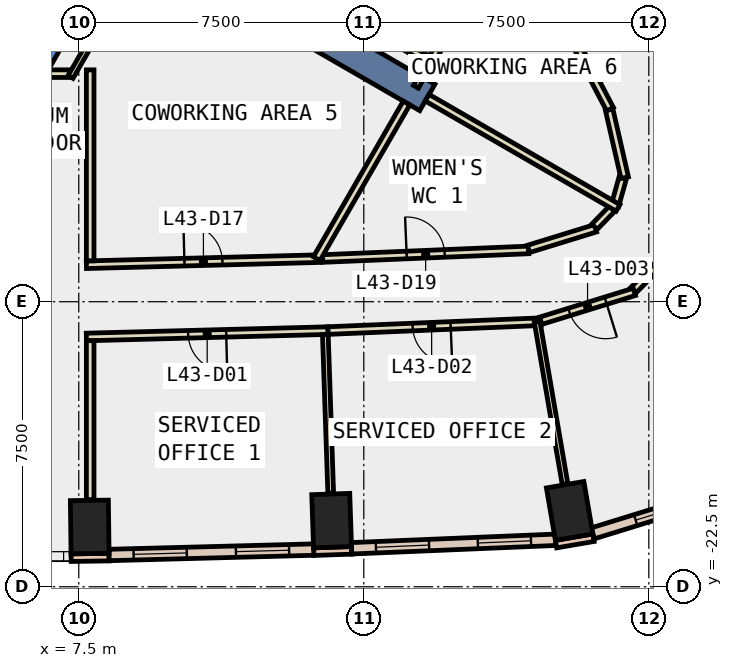
"""IFC4 building model, lengths in metres.
Left out: names, types, materials, properties, quantities, classifications, styles, units other than length and angle.
Written with IfcOpenShell. Run it as: python <this file> out.ifc"""

import sys

from ifc_helpers import new_model, si_unit, direction, frame, frame_2d, origin, origin_2d, place, context, subcontext, project, spatial, polyline, rectangle, outline, extrude, element, fill, save


model = new_model("IFC4")
c1 = context("Model", 3, precision=1e-05, world=origin(), true_north=direction((0.0, 1.0)))
c2 = subcontext(c1, "Body", "Model", "MODEL_VIEW")
j1 = project(units=[si_unit("LENGTHUNIT", "METRE"), si_unit("PLANEANGLEUNIT", "RADIAN")], contexts=[c1])
p1 = place(None, origin())
s1 = spatial("IfcSite", under=j1, at=p1, CompositionType="ELEMENT")
p2 = place(p1, origin())
s2 = spatial("IfcBuilding", under=s1, at=p2, CompositionType="ELEMENT")
p3 = place(p2, frame((0.0, 0.0, 194.0)))
s3 = spatial("IfcBuildingStorey", under=s2, at=p3, CompositionType="ELEMENT", Elevation=194.0)
for number, where, z_axis, x_axis in (
    (1, (7.788, -20.927, -0.4), (0.0, 0.0, 1.0), (1.0, 0.013, 0.0)),
    (2, (14.154, -20.76, -0.4), (0.0, 0.0, 1.0), (0.999, 0.034, 0.0)),
    (3, (20.417, -20.505, -0.4), (0.0, 0.0, 1.0), (0.986, 0.169, 0.0)),
):
    element("IfcColumn", number, at=place(p3, frame(where, z_axis=z_axis, x_axis=x_axis)), inside=s3, PredefinedType="COLUMN", context=c2, shape_type="SweptSolid", body=[
        extrude(rectangle(XDim=1.0, YDim=1.4, at=origin_2d()), origin(), (0.0, 0.0, 1.0), 4.2),
    ])
p4 = place(p3, frame((0.0, 0.0, -0.4)))
e4 = element("IfcWall", 4, at=p4, inside=s3, PredefinedType="SHEAR", context=c2, shape_type="SweptSolid", body=[
    extrude(outline(polyline([(6.64, -9.0), (13.279, 2.5), (12.471, 2.5), (6.235, -8.3), (6.64, -9.0)])), origin(), (0.0, 0.0, 1.0), 4.2),
])
p5 = place(p3, frame((8.877, -5.125, -0.4), z_axis=(0.0, 0.0, 1.0), x_axis=(0.866017533419, -0.500013631625, 0.0)))
e5 = element("IfcWall", 5, at=p5, inside=s3, PredefinedType="SHEAR", context=c2, shape_type="SweptSolid", body=[
    extrude(rectangle(XDim=9.0, YDim=0.8, at=frame_2d((4.5, 0.0))), origin(), (0.0, 0.0, 1.0), 4.2),
])
p6 = place(p3, frame((7.299, -21.734, 0.0), z_axis=(0.0, 0.0, 1.0), x_axis=(0.999903186316, 0.013914668364, 0.0)))
e6 = element("IfcWall", 6, at=p6, inside=s3, PredefinedType="STANDARD", context=c2, shape_type="SweptSolid", body=[
    extrude(rectangle(XDim=1.0, YDim=0.2, at=frame_2d((0.5, 0.0))), origin(), (0.0, 0.0, 1.0), 3.8),
])
p7 = place(p3, frame((13.682, -21.576, 0.0), z_axis=(0.0, 0.0, 1.0), x_axis=(0.999423561854, 0.033949138587, 0.0)))
e7 = element("IfcWall", 7, at=p7, inside=s3, PredefinedType="STANDARD", context=c2, shape_type="SweptSolid", body=[
    extrude(rectangle(XDim=1.0, YDim=0.2, at=frame_2d((0.5, 0.0))), origin(), (0.0, 0.0, 1.0), 3.8),
])
p8 = place(p3, frame((20.059, -21.378, 0.0), z_axis=(0.0, 0.0, 1.0), x_axis=(0.985631544579, 0.168909615862, 0.0)))
e8 = element("IfcWall", 8, at=p8, inside=s3, PredefinedType="STANDARD", context=c2, shape_type="SweptSolid", body=[
    extrude(rectangle(XDim=1.0, YDim=0.2, at=frame_2d((0.5, 0.0))), origin(), (0.0, 0.0, 1.0), 3.8),
])
p9 = place(p3, frame((8.297, -21.664, 0.0), z_axis=(0.0, 0.0, 1.0), x_axis=(0.999651908676, 0.026382977093, 0.0)))
e9 = element("IfcWall", 9, at=p9, inside=s3, PredefinedType="STANDARD", context=c2, shape_type="SweptSolid", body=[
    extrude(rectangle(XDim=5.386, YDim=0.3, at=frame_2d((2.693, 0.0))), origin(), (0.0, 0.0, 1.0), 3.8),
])
p10 = place(p9, frame((0.646, 0.0, 0.9)))
e10 = element("IfcOpeningElement", 10, at=p10, cuts=e9, PredefinedType="OPENING", context=c2, shape_type="SweptSolid", body=[
    extrude(rectangle(XDim=1.4, YDim=2.6, at=frame_2d((0.7, 1.3))), frame((0.0, 0.16, 0.0), z_axis=(0.0, -1.0, 0.0), x_axis=(1.0, 0.0, 0.0)), (0.0, 0.0, 1.0), 0.32),
])
p11 = place(p9, frame((3.339, 0.0, 0.9)))
e11 = element("IfcOpeningElement", 11, at=p11, cuts=e9, PredefinedType="OPENING", context=c2, shape_type="SweptSolid", body=[
    extrude(rectangle(XDim=1.4, YDim=2.6, at=frame_2d((0.7, 1.3))), frame((0.0, 0.16, 0.0), z_axis=(0.0, -1.0, 0.0), x_axis=(1.0, 0.0, 0.0)), (0.0, 0.0, 1.0), 0.32),
])
p12 = place(p3, frame((14.678, -21.488, 0.0), z_axis=(0.0, 0.0, 1.0), x_axis=(0.999127941775, 0.041753514387, 0.0)))
e12 = element("IfcWall", 12, at=p12, inside=s3, PredefinedType="STANDARD", context=c2, shape_type="SweptSolid", body=[
    extrude(rectangle(XDim=5.368, YDim=0.3, at=frame_2d((2.684, 0.0))), origin(), (0.0, 0.0, 1.0), 3.8),
])
p13 = place(p12, frame((0.642, 0.0, 0.9)))
e13 = element("IfcOpeningElement", 13, at=p13, cuts=e12, PredefinedType="OPENING", context=c2, shape_type="SweptSolid", body=[
    extrude(rectangle(XDim=1.4, YDim=2.6, at=frame_2d((0.7, 1.3))), frame((0.0, 0.16, 0.0), z_axis=(0.0, -1.0, 0.0), x_axis=(1.0, 0.0, 0.0)), (0.0, 0.0, 1.0), 0.32),
])
p14 = place(p12, frame((3.326, 0.0, 0.9)))
e14 = element("IfcOpeningElement", 14, at=p14, cuts=e12, PredefinedType="OPENING", context=c2, shape_type="SweptSolid", body=[
    extrude(rectangle(XDim=1.4, YDim=2.6, at=frame_2d((0.7, 1.3))), frame((0.0, 0.16, 0.0), z_axis=(0.0, -1.0, 0.0), x_axis=(1.0, 0.0, 0.0)), (0.0, 0.0, 1.0), 0.32),
])
p15 = place(p3, frame((21.024, -21.095, 0.0), z_axis=(0.0, 0.0, 1.0), x_axis=(0.955692086233, 0.29436819854, 0.0)))
e15 = element("IfcWall", 15, at=p15, inside=s3, PredefinedType="STANDARD", context=c2, shape_type="SweptSolid", body=[
    extrude(rectangle(XDim=3.767, YDim=0.3, at=frame_2d((1.884, 0.0))), origin(), (0.0, 0.0, 1.0), 3.8),
])
p16 = place(p15, frame((1.183, 0.0, 0.9)))
e16 = element("IfcOpeningElement", 16, at=p16, cuts=e15, PredefinedType="OPENING", context=c2, shape_type="SweptSolid", body=[
    extrude(rectangle(XDim=1.4, YDim=2.6, at=frame_2d((0.7, 1.3))), frame((0.0, 0.16, 0.0), z_axis=(0.0, -1.0, 0.0), x_axis=(1.0, 0.0, 0.0)), (0.0, 0.0, 1.0), 0.32),
])
p17 = place(p3, frame((7.7, -14.027, 0.0), z_axis=(0.0, 0.0, 1.0), x_axis=(0.999653919353, 0.026306682088, 0.0)))
e17 = element("IfcWall", 17, at=p17, inside=s3, PredefinedType="PARTITIONING", context=c2, shape_type="SweptSolid", body=[
    extrude(rectangle(XDim=6.162, YDim=0.2, at=frame_2d((3.081, 0.0))), origin(), (0.0, 0.0, 1.0), 3.8),
])
p18 = place(p17, frame((2.581, 0.0, 0.0)))
e18 = element("IfcOpeningElement", 18, at=p18, cuts=e17, PredefinedType="OPENING", context=c2, shape_type="SweptSolid", body=[
    extrude(rectangle(XDim=1.0, YDim=2.1, at=frame_2d((0.5, 1.05))), frame((0.0, 0.11, 0.0), z_axis=(0.0, -1.0, 0.0), x_axis=(1.0, 0.0, 0.0)), (0.0, 0.0, 1.0), 0.22),
])
p19 = place(p3, frame((13.919, -13.863, 0.0), z_axis=(0.0, 0.0, 1.0), x_axis=(0.999130261307, 0.041697972867, 0.0)))
e19 = element("IfcWall", 19, at=p19, inside=s3, PredefinedType="PARTITIONING", context=c2, shape_type="SweptSolid", body=[
    extrude(rectangle(XDim=5.422, YDim=0.2, at=frame_2d((2.711, 0.0))), origin(), (0.0, 0.0, 1.0), 3.8),
])
p20 = place(p19, frame((2.211, 0.0, 0.0)))
e20 = element("IfcOpeningElement", 20, at=p20, cuts=e19, PredefinedType="OPENING", context=c2, shape_type="SweptSolid", body=[
    extrude(rectangle(XDim=1.0, YDim=2.1, at=frame_2d((0.5, 1.05))), frame((0.0, 0.11, 0.0), z_axis=(0.0, -1.0, 0.0), x_axis=(1.0, 0.0, 0.0)), (0.0, 0.0, 1.0), 0.22),
])
p21 = place(p3, frame((19.332, -13.611, 0.0), z_axis=(0.0, 0.0, 1.0), x_axis=(0.955790442908, 0.294048685161, 0.0)))
e21 = element("IfcWall", 21, at=p21, inside=s3, PredefinedType="PARTITIONING", context=c2, shape_type="SweptSolid", body=[
    extrude(rectangle(XDim=1.846, YDim=0.2, at=frame_2d((0.923, 0.0))), origin(), (0.0, 0.0, 1.0), 3.8),
])
p22 = place(p3, frame((21.072, -13.026, 0.0), z_axis=(0.0, 0.0, 1.0), x_axis=(0.697252405765, 0.716825698936, 0.0)))
e22 = element("IfcWall", 22, at=p22, inside=s3, PredefinedType="PARTITIONING", context=c2, shape_type="SweptSolid", body=[
    extrude(rectangle(XDim=0.661, YDim=0.2, at=frame_2d((0.331, 0.0))), origin(), (0.0, 0.0, 1.0), 3.8),
])
p23 = place(p3, frame((21.608, -12.476, 0.0), z_axis=(0.0, 0.0, 1.0), x_axis=(0.270277025631, 0.962782597171, 0.0)))
e23 = element("IfcWall", 23, at=p23, inside=s3, PredefinedType="PARTITIONING", context=c2, shape_type="SweptSolid", body=[
    extrude(rectangle(XDim=0.77, YDim=0.2, at=frame_2d((0.385, 0.0))), origin(), (0.0, 0.0, 1.0), 3.8),
])
p24 = place(p3, frame((21.866, -11.737, 0.0), z_axis=(0.0, 0.0, 1.0), x_axis=(-0.222871656966, 0.974847795567, 0.0)))
e24 = element("IfcWall", 24, at=p24, inside=s3, PredefinedType="PARTITIONING", context=c2, shape_type="SweptSolid", body=[
    extrude(rectangle(XDim=1.839, YDim=0.2, at=frame_2d((0.919, 0.0))), origin(), (0.0, 0.0, 1.0), 3.8),
])
p25 = place(p3, frame((21.48, -9.935, 0.0), z_axis=(0.0, 0.0, 1.0), x_axis=(-0.465356775138, 0.885123195851, 0.0)))
e25 = element("IfcWall", 25, at=p25, inside=s3, PredefinedType="PARTITIONING", context=c2, shape_type="SweptSolid", body=[
    extrude(rectangle(XDim=5.682, YDim=0.2, at=frame_2d((2.841, 0.0))), origin(), (0.0, 0.0, 1.0), 3.8),
])
p26 = place(p25, frame((2.341, 0.0, 0.0)))
e26 = element("IfcOpeningElement", 26, at=p26, cuts=e25, PredefinedType="OPENING", context=c2, shape_type="SweptSolid", body=[
    extrude(rectangle(XDim=1.0, YDim=2.1, at=frame_2d((0.5, 1.05))), frame((0.0, 0.11, 0.0), z_axis=(0.0, -1.0, 0.0), x_axis=(1.0, 0.0, 0.0)), (0.0, 0.0, 1.0), 0.22),
])
p27 = place(p3, frame((14.059, -15.76, 0.0), z_axis=(0.0, 0.0, 1.0), x_axis=(-0.999651338269, -0.026404580978, 0.0)))
e27 = element("IfcWall", 27, at=p27, inside=s3, PredefinedType="PARTITIONING", context=c2, shape_type="SweptSolid", body=[
    extrude(rectangle(XDim=6.361, YDim=0.2, at=frame_2d((3.181, 0.0))), origin(), (0.0, 0.0, 1.0), 3.8),
])
p28 = place(p27, frame((2.681, 0.0, 0.0)))
e28 = element("IfcOpeningElement", 28, at=p28, cuts=e27, PredefinedType="OPENING", context=c2, shape_type="SweptSolid", body=[
    extrude(rectangle(XDim=1.0, YDim=2.1, at=frame_2d((0.5, 1.05))), frame((0.0, 0.11, 0.0), z_axis=(0.0, -1.0, 0.0), x_axis=(1.0, 0.0, 0.0)), (0.0, 0.0, 1.0), 0.22),
])
p29 = place(p3, frame((19.661, -15.525, 0.0), z_axis=(0.0, 0.0, 1.0), x_axis=(-0.999127706659, -0.041759140148, 0.0)))
e29 = element("IfcWall", 29, at=p29, inside=s3, PredefinedType="PARTITIONING", context=c2, shape_type="SweptSolid", body=[
    extrude(rectangle(XDim=5.607, YDim=0.2, at=frame_2d((2.803, 0.0))), origin(), (0.0, 0.0, 1.0), 3.8),
])
p30 = place(p29, frame((2.378, 0.0, 0.0)))
e30 = element("IfcOpeningElement", 30, at=p30, cuts=e29, PredefinedType="OPENING", context=c2, shape_type="SweptSolid", body=[
    extrude(rectangle(XDim=1.0, YDim=2.1, at=frame_2d((0.5, 1.05))), frame((0.0, 0.11, 0.0), z_axis=(0.0, -1.0, 0.0), x_axis=(1.0, 0.0, 0.0)), (0.0, 0.0, 1.0), 0.22),
])
p31 = place(p3, frame((23.236, -13.528, 0.0), z_axis=(0.0, 0.0, 1.0), x_axis=(-0.698551276451, -0.715560000397, 0.0)))
e31 = element("IfcWall", 31, at=p31, inside=s3, PredefinedType="PARTITIONING", context=c2, shape_type="SweptSolid", body=[
    extrude(rectangle(XDim=1.636, YDim=0.2, at=frame_2d((0.818, 0.0))), origin(), (0.0, 0.0, 1.0), 3.8),
])
p32 = place(p3, frame((22.119, -14.741, 0.0), z_axis=(0.0, 0.0, 1.0), x_axis=(-0.955612889251, -0.294625195625, 0.0)))
e32 = element("IfcWall", 32, at=p32, inside=s3, PredefinedType="PARTITIONING", context=c2, shape_type="SweptSolid", body=[
    extrude(rectangle(XDim=2.576, YDim=0.2, at=frame_2d((1.288, 0.0))), origin(), (0.0, 0.0, 1.0), 3.8),
])
p33 = place(p32, frame((0.788, 0.0, 0.0)))
e33 = element("IfcOpeningElement", 33, at=p33, cuts=e32, PredefinedType="OPENING", context=c2, shape_type="SweptSolid", body=[
    extrude(rectangle(XDim=1.0, YDim=2.1, at=frame_2d((0.5, 1.05))), frame((0.0, 0.11, 0.0), z_axis=(0.0, -1.0, 0.0), x_axis=(1.0, 0.0, 0.0)), (0.0, 0.0, 1.0), 0.22),
])
p34 = place(p3, frame((19.75, -2.563, 0.0), z_axis=(0.0, 0.0, 1.0), x_axis=(0.465444987791, -0.885076812113, 0.0)))
e34 = element("IfcWall", 34, at=p34, inside=s3, PredefinedType="PARTITIONING", context=c2, shape_type="SweptSolid", body=[
    extrude(rectangle(XDim=7.578, YDim=0.2, at=frame_2d((3.789, 0.0))), origin(), (0.0, 0.0, 1.0), 3.8),
])
p35 = place(p34, frame((3.289, 0.0, 0.0)))
e35 = element("IfcOpeningElement", 35, at=p35, cuts=e34, PredefinedType="OPENING", context=c2, shape_type="SweptSolid", body=[
    extrude(rectangle(XDim=1.0, YDim=2.1, at=frame_2d((0.5, 1.05))), frame((0.0, 0.11, 0.0), z_axis=(0.0, -1.0, 0.0), x_axis=(1.0, 0.0, 0.0)), (0.0, 0.0, 1.0), 0.22),
])
p36 = place(p3, frame((6.641, -8.999, 0.0), z_axis=(0.0, 0.0, 1.0), x_axis=(1.0, 0.0, 0.0)))
e36 = element("IfcWall", 36, at=p36, inside=s3, PredefinedType="PARTITIONING", context=c2, shape_type="SweptSolid", body=[
    extrude(rectangle(XDim=0.617, YDim=0.2, at=frame_2d((0.309, 0.0))), origin(), (0.0, 0.0, 1.0), 3.8),
])
p37 = place(p3, frame((7.283, -9.086, 0.0), z_axis=(0.0, 0.0, 1.0), x_axis=(0.499843936326, 0.866115488442, 0.0)))
e37 = element("IfcWall", 37, at=p37, inside=s3, PredefinedType="PARTITIONING", context=c2, shape_type="SweptSolid", body=[
    extrude(rectangle(XDim=3.827, YDim=0.15, at=frame_2d((1.914, 0.0))), origin(), (0.0, 0.0, 1.0), 3.8),
])
p38 = place(p3, frame((7.8, -8.899, 0.0), z_axis=(0.0, 0.0, 1.0), x_axis=(0.0, -1.0, 0.0)))
e38 = element("IfcWall", 38, at=p38, inside=s3, PredefinedType="PARTITIONING", context=c2, shape_type="SweptSolid", body=[
    extrude(rectangle(XDim=5.025, YDim=0.2, at=frame_2d((2.513, 0.0))), origin(), (0.0, 0.0, 1.0), 3.8),
])
p39 = place(p3, frame((7.8, -16.025, 0.0), z_axis=(0.0, 0.0, 1.0), x_axis=(0.0, -1.0, 0.0)))
e39 = element("IfcWall", 39, at=p39, inside=s3, PredefinedType="PARTITIONING", context=c2, shape_type="SweptSolid", body=[
    extrude(rectangle(XDim=4.182, YDim=0.2, at=frame_2d((2.091, 0.0))), origin(), (0.0, 0.0, 1.0), 3.8),
])
p40 = place(p3, frame((9.853, -4.684, 0.0), z_axis=(0.0, 0.0, 1.0), x_axis=(0.865999791918, -0.500044358431, 0.0)))
e40 = element("IfcWall", 40, at=p40, inside=s3, PredefinedType="PARTITIONING", context=c2, shape_type="SweptSolid", body=[
    extrude(rectangle(XDim=8.075, YDim=0.2, at=frame_2d((4.038, 0.0))), origin(), (0.0, 0.0, 1.0), 3.8),
])
p41 = place(p3, frame((16.125, -9.771, 0.0), z_axis=(0.0, 0.0, 1.0), x_axis=(-0.500030759312, -0.866007644159, 0.0)))
e41 = element("IfcWall", 41, at=p41, inside=s3, PredefinedType="PARTITIONING", context=c2, shape_type="SweptSolid", body=[
    extrude(rectangle(XDim=4.73, YDim=0.2, at=frame_2d((2.365, 0.0))), origin(), (0.0, 0.0, 1.0), 3.8),
])
p42 = place(p3, frame((16.71, -8.758, 0.0), z_axis=(0.0, 0.0, 1.0), x_axis=(-0.500013496215, -0.866017611601, 0.0)))
e42 = element("IfcWall", 42, at=p42, inside=s3, PredefinedType="PARTITIONING", context=c2, shape_type="SweptSolid", body=[
    extrude(rectangle(XDim=0.678, YDim=0.15, at=frame_2d((0.339, 0.0))), origin(), (0.0, 0.0, 1.0), 3.8),
])
p43 = place(p3, frame((18.882, -4.995, 0.0), z_axis=(0.0, 0.0, 1.0), x_axis=(-0.499895813511, -0.866085547527, 0.0)))
e43 = element("IfcWall", 43, at=p43, inside=s3, PredefinedType="PARTITIONING", context=c2, shape_type="SweptSolid", body=[
    extrude(rectangle(XDim=4.145, YDim=0.2, at=frame_2d((2.073, 0.0))), origin(), (0.0, 0.0, 1.0), 3.8),
])
p44 = place(p3, frame((16.667, -9.631, 0.0), z_axis=(0.0, 0.0, 1.0), x_axis=(0.866032775405, -0.499987231761, 0.0)))
e44 = element("IfcWall", 44, at=p44, inside=s3, PredefinedType="PARTITIONING", context=c2, shape_type="SweptSolid", body=[
    extrude(rectangle(XDim=5.8, YDim=0.2, at=frame_2d((2.9, 0.0))), origin(), (0.0, 0.0, 1.0), 3.8),
])
p45 = place(p3, frame((13.988, -15.862, 0.0), z_axis=(0.0, 0.0, 1.0), x_axis=(0.033931247732, -0.999424169423, 0.0)))
e45 = element("IfcWall", 45, at=p45, inside=s3, PredefinedType="PARTITIONING", context=c2, shape_type="SweptSolid", body=[
    extrude(rectangle(XDim=4.18, YDim=0.15, at=frame_2d((2.09, 0.0))), origin(), (0.0, 0.0, 1.0), 3.8),
])
p46 = place(p3, frame((19.561, -15.529, 0.0), z_axis=(0.0, 0.0, 1.0), x_axis=(0.169546150064, -0.98552224886, 0.0)))
e46 = element("IfcWall", 46, at=p46, inside=s3, PredefinedType="PARTITIONING", context=c2, shape_type="SweptSolid", body=[
    extrude(rectangle(XDim=4.329, YDim=0.15, at=frame_2d((2.164, 0.0))), origin(), (0.0, 0.0, 1.0), 3.8),
])
p47 = place(p10, origin())
e47 = element("IfcWindow", 47, at=p47, inside=s3, PartitioningType="SINGLE_PANEL", PredefinedType="WINDOW", context=c2, shape_type="SweptSolid", body=[
    extrude(rectangle(XDim=1.4, YDim=2.6, at=frame_2d((0.7, 1.3))), frame((0.0, 0.03, 0.0), z_axis=(0.0, -1.0, 0.0), x_axis=(1.0, 0.0, 0.0)), (0.0, 0.0, 1.0), 0.06),
])
fill(e10, e47)
p48 = place(p11, origin())
e48 = element("IfcWindow", 48, at=p48, inside=s3, PartitioningType="SINGLE_PANEL", PredefinedType="WINDOW", context=c2, shape_type="SweptSolid", body=[
    extrude(rectangle(XDim=1.4, YDim=2.6, at=frame_2d((0.7, 1.3))), frame((0.0, 0.03, 0.0), z_axis=(0.0, -1.0, 0.0), x_axis=(1.0, 0.0, 0.0)), (0.0, 0.0, 1.0), 0.06),
])
fill(e11, e48)
p49 = place(p13, origin())
e49 = element("IfcWindow", 49, at=p49, inside=s3, PartitioningType="SINGLE_PANEL", PredefinedType="WINDOW", context=c2, shape_type="SweptSolid", body=[
    extrude(rectangle(XDim=1.4, YDim=2.6, at=frame_2d((0.7, 1.3))), frame((0.0, 0.03, 0.0), z_axis=(0.0, -1.0, 0.0), x_axis=(1.0, 0.0, 0.0)), (0.0, 0.0, 1.0), 0.06),
])
fill(e13, e49)
p50 = place(p14, origin())
e50 = element("IfcWindow", 50, at=p50, inside=s3, PartitioningType="SINGLE_PANEL", PredefinedType="WINDOW", context=c2, shape_type="SweptSolid", body=[
    extrude(rectangle(XDim=1.4, YDim=2.6, at=frame_2d((0.7, 1.3))), frame((0.0, 0.03, 0.0), z_axis=(0.0, -1.0, 0.0), x_axis=(1.0, 0.0, 0.0)), (0.0, 0.0, 1.0), 0.06),
])
fill(e14, e50)
p51 = place(p16, origin())
e51 = element("IfcWindow", 51, at=p51, inside=s3, PartitioningType="SINGLE_PANEL", PredefinedType="WINDOW", context=c2, shape_type="SweptSolid", body=[
    extrude(rectangle(XDim=1.4, YDim=2.6, at=frame_2d((0.7, 1.3))), frame((0.0, 0.03, 0.0), z_axis=(0.0, -1.0, 0.0), x_axis=(1.0, 0.0, 0.0)), (0.0, 0.0, 1.0), 0.06),
])
fill(e16, e51)
p52 = place(p28, origin())
e52 = element("IfcDoor", 52, at=p52, inside=s3, OperationType="SINGLE_SWING_LEFT", PredefinedType="DOOR", context=c2, shape_type="SweptSolid", body=[
    extrude(rectangle(XDim=1.0, YDim=2.1, at=frame_2d((0.5, 1.05))), frame((0.0, 0.025, 0.0), z_axis=(0.0, -1.0, 0.0), x_axis=(1.0, 0.0, 0.0)), (0.0, 0.0, 1.0), 0.05),
])
fill(e28, e52)
p53 = place(p30, origin())
e53 = element("IfcDoor", 53, at=p53, inside=s3, OperationType="SINGLE_SWING_LEFT", PredefinedType="DOOR", context=c2, shape_type="SweptSolid", body=[
    extrude(rectangle(XDim=1.0, YDim=2.1, at=frame_2d((0.5, 1.05))), frame((0.0, 0.025, 0.0), z_axis=(0.0, -1.0, 0.0), x_axis=(1.0, 0.0, 0.0)), (0.0, 0.0, 1.0), 0.05),
])
fill(e30, e53)
p54 = place(p33, origin())
e54 = element("IfcDoor", 54, at=p54, inside=s3, OperationType="SINGLE_SWING_LEFT", PredefinedType="DOOR", context=c2, shape_type="SweptSolid", body=[
    extrude(rectangle(XDim=1.0, YDim=2.1, at=frame_2d((0.5, 1.05))), frame((0.0, 0.025, 0.0), z_axis=(0.0, -1.0, 0.0), x_axis=(1.0, 0.0, 0.0)), (0.0, 0.0, 1.0), 0.05),
])
fill(e33, e54)
p55 = place(p18, origin())
e55 = element("IfcDoor", 55, at=p55, inside=s3, OperationType="SINGLE_SWING_LEFT", PredefinedType="DOOR", context=c2, shape_type="SweptSolid", body=[
    extrude(rectangle(XDim=1.0, YDim=2.1, at=frame_2d((0.5, 1.05))), frame((0.0, 0.025, 0.0), z_axis=(0.0, -1.0, 0.0), x_axis=(1.0, 0.0, 0.0)), (0.0, 0.0, 1.0), 0.05),
])
fill(e18, e55)
p56 = place(p20, origin())
e56 = element("IfcDoor", 56, at=p56, inside=s3, OperationType="SINGLE_SWING_LEFT", PredefinedType="DOOR", context=c2, shape_type="SweptSolid", body=[
    extrude(rectangle(XDim=1.0, YDim=2.1, at=frame_2d((0.5, 1.05))), frame((0.0, 0.025, 0.0), z_axis=(0.0, -1.0, 0.0), x_axis=(1.0, 0.0, 0.0)), (0.0, 0.0, 1.0), 0.05),
])
fill(e20, e56)
save(model, sys.argv[1])
